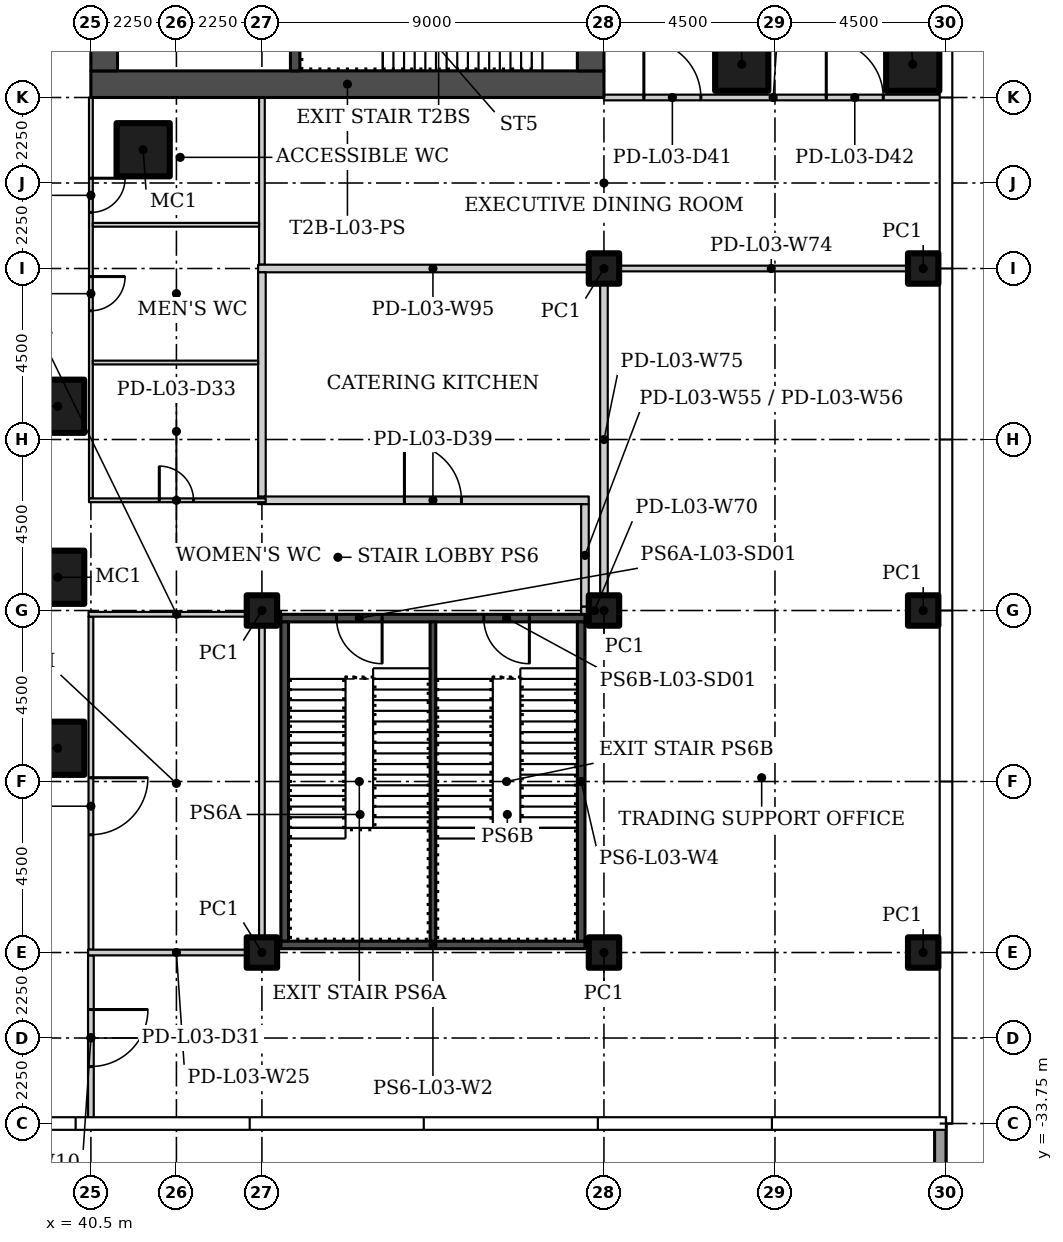
"""IFC4 building model, lengths in metres.
Left out: names, types, materials, properties, quantities, classifications, styles, units other than length and angle.
Written with IfcOpenShell. Run it as: python <this file> out.ifc"""

import sys

from ifc_helpers import new_model, si_unit, direction, frame, frame_2d, origin, origin_2d, place, context, subcontext, project, spatial, rectangle, hollow_rectangle, extrude, element, fill, save


model = new_model("IFC4")
c1 = context("Model", 3, precision=1e-05, world=origin(), true_north=direction((0.0, 1.0)))
c2 = subcontext(c1, "Body", "Model", "MODEL_VIEW")
j1 = project(units=[si_unit("LENGTHUNIT", "METRE"), si_unit("PLANEANGLEUNIT", "RADIAN")], contexts=[c1])
p1 = place(None, origin())
s1 = spatial("IfcSite", under=j1, at=p1, CompositionType="ELEMENT")
p2 = place(p1, origin())
s2 = spatial("IfcBuilding", under=s1, at=p2, CompositionType="ELEMENT")
p3 = place(p2, frame((0.0, 0.0, 18.5)))
s3 = spatial("IfcBuildingStorey", under=s2, at=p3, CompositionType="ELEMENT", Elevation=18.5)
for number, where in (
    (1, (41.875, -8.125, 0.0)),
    (2, (39.625, -14.875, 0.0)),
    (3, (39.625, -19.375, 0.0)),
    (4, (39.625, -23.875, 0.0)),
    (5, (57.625, -5.875, 0.0)),
    (6, (62.125, -5.875, 0.0)),
):
    element("IfcColumn", number, at=place(p3, frame(where)), inside=s3, PredefinedType="COLUMN", context=c2, shape_type="SweptSolid", body=[
        extrude(hollow_rectangle(XDim=1.4, YDim=1.4, WallThickness=0.06, at=origin_2d()), origin(), (0.0, 0.0, 1.0), 4.6),
    ])
for number, where in (
    (7, (45.0, -29.25, 0.0)),
    (8, (45.0, -20.25, 0.0)),
    (9, (54.0, -29.25, 0.0)),
    (10, (54.0, -20.25, 0.0)),
    (11, (54.0, -11.25, 0.0)),
    (12, (62.4, -29.25, 0.0)),
    (13, (62.4, -20.25, 0.0)),
    (14, (62.4, -11.25, 0.0)),
):
    element("IfcColumn", number, at=place(p3, frame(where)), inside=s3, PredefinedType="COLUMN", context=c2, shape_type="SweptSolid", body=[
        extrude(hollow_rectangle(XDim=0.8, YDim=0.8, WallThickness=0.03, at=origin_2d()), origin(), (0.0, 0.0, 1.0), 4.6),
    ])
p4 = place(p3, frame((40.5, -29.325, 0.0), z_axis=(0.0, 0.0, 1.0), x_axis=(0.0, -1.0, 0.0)))
e15 = element("IfcWall", 15, at=p4, inside=s3, PredefinedType="PARTITIONING", context=c2, shape_type="SweptSolid", body=[
    extrude(rectangle(XDim=4.33, YDim=0.15, at=frame_2d((2.165, 0.0))), origin(), (0.0, 0.0, 1.0), 4.6),
])
p5 = place(p4, frame((1.425, 0.0, 0.0)))
e16 = element("IfcOpeningElement", 16, at=p5, cuts=e15, PredefinedType="OPENING", context=c2, shape_type="SweptSolid", body=[
    extrude(rectangle(XDim=1.5, YDim=2.1, at=frame_2d((0.75, 1.05))), frame((0.0, 0.085, 0.0), z_axis=(0.0, -1.0, 0.0), x_axis=(1.0, 0.0, 0.0)), (0.0, 0.0, 1.0), 0.17),
])
p6 = place(p3, frame((40.5, -6.75, 0.0), z_axis=(0.0, 0.0, 1.0), x_axis=(0.0, -1.0, 0.0)))
e17 = element("IfcWall", 17, at=p6, inside=s3, PredefinedType="PARTITIONING", context=c2, shape_type="SweptSolid", body=[
    extrude(rectangle(XDim=10.55, YDim=0.1, at=frame_2d((5.275, 0.0))), origin(), (0.0, 0.0, 1.0), 4.6),
])
p7 = place(p6, frame((2.125, 0.0, 0.0)))
e18 = element("IfcOpeningElement", 18, at=p7, cuts=e17, PredefinedType="OPENING", context=c2, shape_type="SweptSolid", body=[
    extrude(rectangle(XDim=0.9, YDim=2.1, at=frame_2d((0.45, 1.05))), frame((0.0, 0.06, 0.0), z_axis=(0.0, -1.0, 0.0), x_axis=(1.0, 0.0, 0.0)), (0.0, 0.0, 1.0), 0.12),
])
p8 = place(p6, frame((4.712, 0.0, 0.0)))
e19 = element("IfcOpeningElement", 19, at=p8, cuts=e17, PredefinedType="OPENING", context=c2, shape_type="SweptSolid", body=[
    extrude(rectangle(XDim=0.9, YDim=2.1, at=frame_2d((0.45, 1.05))), frame((0.0, 0.06, 0.0), z_axis=(0.0, -1.0, 0.0), x_axis=(1.0, 0.0, 0.0)), (0.0, 0.0, 1.0), 0.12),
])
p9 = place(p3, frame((40.5, -20.412, 0.0), z_axis=(0.0, 0.0, 1.0), x_axis=(0.0, -1.0, 0.0)))
e20 = element("IfcWall", 20, at=p9, inside=s3, PredefinedType="PARTITIONING", context=c2, shape_type="SweptSolid", body=[
    extrude(rectangle(XDim=8.763, YDim=0.125, at=frame_2d((4.381, 0.0))), origin(), (0.0, 0.0, 1.0), 4.6),
])
p10 = place(p9, frame((4.238, 0.0, 0.0)))
e21 = element("IfcOpeningElement", 21, at=p10, cuts=e20, PredefinedType="OPENING", context=c2, shape_type="SweptSolid", body=[
    extrude(rectangle(XDim=1.5, YDim=2.1, at=frame_2d((0.75, 1.05))), frame((0.0, 0.073, 0.0), z_axis=(0.0, -1.0, 0.0), x_axis=(1.0, 0.0, 0.0)), (0.0, 0.0, 1.0), 0.145),
])
p11 = place(p3, frame((45.075, -29.25, 0.0), z_axis=(0.0, 0.0, 1.0), x_axis=(-1.0, 0.0, 0.0)))
e22 = element("IfcWall", 22, at=p11, inside=s3, PredefinedType="PARTITIONING", context=c2, shape_type="SweptSolid", body=[
    extrude(rectangle(XDim=4.65, YDim=0.15, at=frame_2d((2.325, 0.0))), origin(), (0.0, 0.0, 1.0), 4.6),
])
p12 = place(p3, frame((54.0, -6.75, 0.0)))
e23 = element("IfcWall", 23, at=p12, inside=s3, PredefinedType="PARTITIONING", context=c2, shape_type="SweptSolid", body=[
    extrude(rectangle(XDim=8.905, YDim=0.15, at=frame_2d((4.453, 0.0))), origin(), (0.0, 0.0, 1.0), 4.6),
])
p13 = place(p12, frame((1.05, 0.0, 0.0)))
e24 = element("IfcOpeningElement", 24, at=p13, cuts=e23, PredefinedType="OPENING", context=c2, shape_type="SweptSolid", body=[
    extrude(rectangle(XDim=1.5, YDim=2.4, at=frame_2d((0.75, 1.2))), frame((0.0, 0.085, 0.0), z_axis=(0.0, -1.0, 0.0), x_axis=(1.0, 0.0, 0.0)), (0.0, 0.0, 1.0), 0.17),
])
p14 = place(p12, frame((5.85, 0.0, 0.0)))
e25 = element("IfcOpeningElement", 25, at=p14, cuts=e23, PredefinedType="OPENING", context=c2, shape_type="SweptSolid", body=[
    extrude(rectangle(XDim=1.5, YDim=2.4, at=frame_2d((0.75, 1.2))), frame((0.0, 0.085, 0.0), z_axis=(0.0, -1.0, 0.0), x_axis=(1.0, 0.0, 0.0)), (0.0, 0.0, 1.0), 0.17),
])
p15 = place(p3, frame((45.075, -20.35, 0.0), z_axis=(0.0, 0.0, 1.0), x_axis=(-1.0, 0.0, 0.0)))
e26 = element("IfcWall", 26, at=p15, inside=s3, PredefinedType="PARTITIONING", context=c2, shape_type="SweptSolid", body=[
    extrude(rectangle(XDim=4.637, YDim=0.125, at=frame_2d((2.319, 0.0))), origin(), (0.0, 0.0, 1.0), 4.6),
])
p16 = place(p3, frame((45.5, -20.35, 0.0), z_axis=(0.0, 0.0, 1.0), x_axis=(-1.0, 0.0, 0.0)))
e27 = element("IfcWall", 27, at=p16, inside=s3, PredefinedType="PARTITIONING", context=c2, shape_type="SweptSolid", body=[
    extrude(rectangle(XDim=0.575, YDim=0.15, at=frame_2d((0.288, 0.0))), origin(), (0.0, 0.0, 1.0), 4.6),
])
p17 = place(p3, frame((53.5, -17.45, 0.0), z_axis=(0.0, 0.0, 1.0), x_axis=(0.0, -1.0, 0.0)))
e28 = element("IfcWall", 28, at=p17, inside=s3, PredefinedType="PARTITIONING", context=c2, shape_type="SweptSolid", body=[
    extrude(rectangle(XDim=2.7, YDim=0.2, at=frame_2d((1.35, 0.0))), origin(), (0.0, 0.0, 1.0), 4.6),
])
p18 = place(p3, frame((44.9, -17.35, 0.0)))
e29 = element("IfcWall", 29, at=p18, inside=s3, PredefinedType="PARTITIONING", context=c2, shape_type="SweptSolid", body=[
    extrude(rectangle(XDim=8.7, YDim=0.2, at=frame_2d((4.35, 0.0))), origin(), (0.0, 0.0, 1.0), 4.6),
])
p19 = place(p18, frame((3.85, 0.0, 0.0)))
e30 = element("IfcOpeningElement", 30, at=p19, cuts=e29, PredefinedType="OPENING", context=c2, shape_type="SweptSolid", body=[
    extrude(rectangle(XDim=1.5, YDim=2.4, at=frame_2d((0.75, 1.2))), frame((0.0, 0.11, 0.0), z_axis=(0.0, -1.0, 0.0), x_axis=(1.0, 0.0, 0.0)), (0.0, 0.0, 1.0), 0.22),
])
p20 = place(p3, frame((40.45, -17.35, 0.0)))
e31 = element("IfcWall", 31, at=p20, inside=s3, PredefinedType="PARTITIONING", context=c2, shape_type="SweptSolid", body=[
    extrude(rectangle(XDim=4.65, YDim=0.1, at=frame_2d((2.325, 0.0))), origin(), (0.0, 0.0, 1.0), 4.6),
])
p21 = place(p20, frame((1.85, 0.0, 0.0)))
e32 = element("IfcOpeningElement", 32, at=p21, cuts=e31, PredefinedType="OPENING", context=c2, shape_type="SweptSolid", body=[
    extrude(rectangle(XDim=0.9, YDim=2.1, at=frame_2d((0.45, 1.05))), frame((0.0, 0.06, 0.0), z_axis=(0.0, -1.0, 0.0), x_axis=(1.0, 0.0, 0.0)), (0.0, 0.0, 1.0), 0.12),
])
p22 = place(p3, frame((54.1, -20.25, 0.0), z_axis=(0.0, 0.0, 1.0), x_axis=(-1.0, 0.0, 0.0)))
e33 = element("IfcWall", 33, at=p22, inside=s3, PredefinedType="PARTITIONING", context=c2, shape_type="SweptSolid", body=[
    extrude(rectangle(XDim=0.7, YDim=0.2, at=frame_2d((0.35, 0.0))), origin(), (0.0, 0.0, 1.0), 4.6),
])
p23 = place(p3, frame((62.905, -11.25, 0.0), z_axis=(0.0, 0.0, 1.0), x_axis=(-1.0, 0.0, 0.0)))
e34 = element("IfcWall", 34, at=p23, inside=s3, PredefinedType="PARTITIONING", context=c2, shape_type="SweptSolid", body=[
    extrude(rectangle(XDim=9.005, YDim=0.15, at=frame_2d((4.502, 0.0))), origin(), (0.0, 0.0, 1.0), 4.6),
])
p24 = place(p3, frame((54.0, -11.35, 0.0), z_axis=(0.0, 0.0, 1.0), x_axis=(0.0, -1.0, 0.0)))
e35 = element("IfcWall", 35, at=p24, inside=s3, PredefinedType="PARTITIONING", context=c2, shape_type="SweptSolid", body=[
    extrude(rectangle(XDim=8.8, YDim=0.2, at=frame_2d((4.4, 0.0))), origin(), (0.0, 0.0, 1.0), 4.6),
])
p25 = place(p3, frame((45.0, -6.75, 0.0), z_axis=(0.0, 0.0, 1.0), x_axis=(0.0, -1.0, 0.0)))
e36 = element("IfcWall", 36, at=p25, inside=s3, PredefinedType="PARTITIONING", context=c2, shape_type="SweptSolid", body=[
    extrude(rectangle(XDim=4.4, YDim=0.15, at=frame_2d((2.2, 0.0))), origin(), (0.0, 0.0, 1.0), 4.6),
])
p26 = place(p3, frame((45.0, -20.425, 0.0), z_axis=(0.0, 0.0, 1.0), x_axis=(0.0, -1.0, 0.0)))
e37 = element("IfcWall", 37, at=p26, inside=s3, PredefinedType="PARTITIONING", context=c2, shape_type="SweptSolid", body=[
    extrude(rectangle(XDim=8.75, YDim=0.15, at=frame_2d((4.375, 0.0))), origin(), (0.0, 0.0, 1.0), 4.6),
])
p27 = place(p3, frame((44.9, -11.25, 0.0)))
e38 = element("IfcWall", 38, at=p27, inside=s3, PredefinedType="PARTITIONING", context=c2, shape_type="SweptSolid", body=[
    extrude(rectangle(XDim=9.2, YDim=0.2, at=frame_2d((4.6, 0.0))), origin(), (0.0, 0.0, 1.0), 4.6),
])
p28 = place(p3, frame((45.0, -11.35, 0.0), z_axis=(0.0, 0.0, 1.0), x_axis=(0.0, -1.0, 0.0)))
e39 = element("IfcWall", 39, at=p28, inside=s3, PredefinedType="PARTITIONING", context=c2, shape_type="SweptSolid", body=[
    extrude(rectangle(XDim=5.899, YDim=0.2, at=frame_2d((2.95, 0.0))), origin(), (0.0, 0.0, 1.0), 4.6),
])
p29 = place(p3, frame((44.9, -13.725, 0.0), z_axis=(0.0, 0.0, 1.0), x_axis=(-1.0, 0.0, 0.0)))
e40 = element("IfcWall", 40, at=p29, inside=s3, PredefinedType="PARTITIONING", context=c2, shape_type="SweptSolid", body=[
    extrude(rectangle(XDim=4.35, YDim=0.1, at=frame_2d((2.175, 0.0))), origin(), (0.0, 0.0, 1.0), 4.6),
])
p30 = place(p3, frame((44.925, -10.1, 0.0), z_axis=(0.0, 0.0, 1.0), x_axis=(-1.0, 0.0, 0.0)))
e41 = element("IfcWall", 41, at=p30, inside=s3, PredefinedType="PARTITIONING", context=c2, shape_type="SweptSolid", body=[
    extrude(rectangle(XDim=4.375, YDim=0.1, at=frame_2d((2.188, 0.0))), origin(), (0.0, 0.0, 1.0), 4.6),
])
p31 = place(p3, frame((62.85, -35.7, 0.0), z_axis=(0.0, 0.0, 1.0), x_axis=(0.0, 1.0, 0.0)))
e42 = element("IfcWall", 42, at=p31, inside=s3, PredefinedType="PARAPET", context=c2, shape_type="SweptSolid", body=[
    extrude(rectangle(XDim=1.95, YDim=0.3, at=frame_2d((0.975, 0.0))), origin(), (0.0, 0.0, 1.0), 1.1),
])
p32 = place(p3, frame((54.0, -6.4, 0.0), z_axis=(0.0, 0.0, 1.0), x_axis=(-1.0, 0.0, 0.0)))
e43 = element("IfcWall", 43, at=p32, inside=s3, PredefinedType="SHEAR", context=c2, shape_type="SweptSolid", body=[
    extrude(rectangle(XDim=13.5, YDim=0.7, at=frame_2d((6.75, 0.0))), origin(), (0.0, 0.0, 1.0), 4.6),
])
p33 = place(p3, frame((53.65, -6.05, 0.0), z_axis=(0.0, 0.0, 1.0), x_axis=(0.0, 1.0, 0.0)))
e44 = element("IfcWall", 44, at=p33, inside=s3, PredefinedType="SHEAR", context=c2, shape_type="SweptSolid", body=[
    extrude(rectangle(XDim=12.1, YDim=0.7, at=frame_2d((6.05, 0.0))), origin(), (0.0, 0.0, 1.0), 4.6),
])
p34 = place(p33, frame((6.4, 0.0, 0.0)))
e45 = element("IfcOpeningElement", 45, at=p34, cuts=e44, PredefinedType="OPENING", context=c2, shape_type="SweptSolid", body=[
    extrude(rectangle(XDim=1.8, YDim=2.4, at=frame_2d((0.9, 1.2))), frame((0.0, 0.36, 0.0), z_axis=(0.0, -1.0, 0.0), x_axis=(1.0, 0.0, 0.0)), (0.0, 0.0, 1.0), 0.72),
])
p35 = place(p3, frame((40.85, -6.05, 0.0), z_axis=(0.0, 0.0, 1.0), x_axis=(0.0, 1.0, 0.0)))
e46 = element("IfcWall", 46, at=p35, inside=s3, PredefinedType="SHEAR", context=c2, shape_type="SweptSolid", body=[
    extrude(rectangle(XDim=12.1, YDim=0.7, at=frame_2d((6.05, 0.0))), origin(), (0.0, 0.0, 1.0), 4.6),
])
p36 = place(p35, frame((0.8, 0.0, 0.0)))
e47 = element("IfcOpeningElement", 47, at=p36, cuts=e46, PredefinedType="OPENING", context=c2, shape_type="SweptSolid", body=[
    extrude(rectangle(XDim=1.2, YDim=2.1, at=frame_2d((0.6, 1.05))), frame((0.0, 0.36, 0.0), z_axis=(0.0, -1.0, 0.0), x_axis=(1.0, 0.0, 0.0)), (0.0, 0.0, 1.0), 0.72),
])
p37 = place(p35, frame((6.4, 0.0, 0.0)))
e48 = element("IfcOpeningElement", 48, at=p37, cuts=e46, PredefinedType="OPENING", context=c2, shape_type="SweptSolid", body=[
    extrude(rectangle(XDim=1.8, YDim=2.4, at=frame_2d((0.9, 1.2))), frame((0.0, 0.36, 0.0), z_axis=(0.0, -1.0, 0.0), x_axis=(1.0, 0.0, 0.0)), (0.0, 0.0, 1.0), 0.72),
])
p38 = place(p3, frame((45.875, -6.05, 0.0), z_axis=(0.0, 0.0, 1.0), x_axis=(0.0, 1.0, 0.0)))
e49 = element("IfcWall", 49, at=p38, inside=s3, PredefinedType="SHEAR", context=c2, shape_type="SweptSolid", body=[
    extrude(rectangle(XDim=2.55, YDim=0.25, at=frame_2d((1.275, 0.0))), origin(), (0.0, 0.0, 1.0), 4.6),
])
p39 = place(p3, frame((53.5, -20.45, 0.0), z_axis=(0.0, 0.0, 1.0), x_axis=(-1.0, 0.0, 0.0)))
e50 = element("IfcWall", 50, at=p39, inside=s3, PredefinedType="SHEAR", context=c2, shape_type="SweptSolid", body=[
    extrude(rectangle(XDim=8.0, YDim=0.2, at=frame_2d((4.0, 0.0))), origin(), (0.0, 0.0, 1.0), 4.6),
])
p40 = place(p39, frame((5.337, 0.0, 0.0)))
e51 = element("IfcOpeningElement", 51, at=p40, cuts=e50, PredefinedType="OPENING", context=c2, shape_type="SweptSolid", body=[
    extrude(rectangle(XDim=1.2, YDim=2.4, at=frame_2d((0.6, 1.2))), frame((0.0, 0.11, 0.0), z_axis=(0.0, -1.0, 0.0), x_axis=(1.0, 0.0, 0.0)), (0.0, 0.0, 1.0), 0.22),
])
p41 = place(p39, frame((1.462, 0.0, 0.0)))
e52 = element("IfcOpeningElement", 52, at=p41, cuts=e50, PredefinedType="OPENING", context=c2, shape_type="SweptSolid", body=[
    extrude(rectangle(XDim=1.2, YDim=2.4, at=frame_2d((0.6, 1.2))), frame((0.0, 0.11, 0.0), z_axis=(0.0, -1.0, 0.0), x_axis=(1.0, 0.0, 0.0)), (0.0, 0.0, 1.0), 0.22),
])
p42 = place(p3, frame((45.5, -29.05, 0.0)))
e53 = element("IfcWall", 53, at=p42, inside=s3, PredefinedType="SHEAR", context=c2, shape_type="SweptSolid", body=[
    extrude(rectangle(XDim=8.0, YDim=0.2, at=frame_2d((4.0, 0.0))), origin(), (0.0, 0.0, 1.0), 4.6),
])
for number, where, z_axis, x_axis in (
    (54, (45.6, -28.95, 0.0), (0.0, 0.0, 1.0), (0.0, 1.0, 0.0)),
    (55, (53.4, -28.95, 0.0), (0.0, 0.0, 1.0), (0.0, 1.0, 0.0)),
):
    element("IfcWall", number, at=place(p3, frame(where, z_axis=z_axis, x_axis=x_axis)), inside=s3, PredefinedType="SHEAR", context=c2, shape_type="SweptSolid", body=[
        extrude(rectangle(XDim=8.4, YDim=0.2, at=frame_2d((4.2, 0.0))), origin(), (0.0, 0.0, 1.0), 4.6),
    ])
p43 = place(p3, frame((49.5, -28.95, 0.0), z_axis=(0.0, 0.0, 1.0), x_axis=(0.0, 1.0, 0.0)))
e56 = element("IfcWall", 56, at=p43, inside=s3, PredefinedType="SHEAR", context=c2, shape_type="SweptSolid", body=[
    extrude(rectangle(XDim=8.4, YDim=0.15, at=frame_2d((4.2, 0.0))), origin(), (0.0, 0.0, 1.0), 4.6),
])
p44 = place(p5, origin())
e57 = element("IfcDoor", 57, at=p44, inside=s3, OperationType="DOUBLE_DOOR_SINGLE_SWING", PredefinedType="DOOR", context=c2, shape_type="SweptSolid", body=[
    extrude(rectangle(XDim=1.5, YDim=2.1, at=frame_2d((0.75, 1.05))), frame((0.0, 0.025, 0.0), z_axis=(0.0, -1.0, 0.0), x_axis=(1.0, 0.0, 0.0)), (0.0, 0.0, 1.0), 0.05),
])
fill(e16, e57)
p45 = place(p10, origin())
e58 = element("IfcDoor", 58, at=p45, inside=s3, OperationType="DOUBLE_DOOR_SINGLE_SWING", PredefinedType="DOOR", context=c2, shape_type="SweptSolid", body=[
    extrude(rectangle(XDim=1.5, YDim=2.1, at=frame_2d((0.75, 1.05))), frame((0.0, 0.025, 0.0), z_axis=(0.0, -1.0, 0.0), x_axis=(1.0, 0.0, 0.0)), (0.0, 0.0, 1.0), 0.05),
])
fill(e21, e58)
p46 = place(p21, origin())
e59 = element("IfcDoor", 59, at=p46, inside=s3, OperationType="SINGLE_SWING_LEFT", PredefinedType="DOOR", context=c2, shape_type="SweptSolid", body=[
    extrude(rectangle(XDim=0.9, YDim=2.1, at=frame_2d((0.45, 1.05))), frame((0.0, 0.025, 0.0), z_axis=(0.0, -1.0, 0.0), x_axis=(1.0, 0.0, 0.0)), (0.0, 0.0, 1.0), 0.05),
])
fill(e32, e59)
p47 = place(p7, origin())
e60 = element("IfcDoor", 60, at=p47, inside=s3, OperationType="SINGLE_SWING_RIGHT", PredefinedType="DOOR", context=c2, shape_type="SweptSolid", body=[
    extrude(rectangle(XDim=0.9, YDim=2.1, at=frame_2d((0.45, 1.05))), frame((0.0, 0.025, 0.0), z_axis=(0.0, -1.0, 0.0), x_axis=(1.0, 0.0, 0.0)), (0.0, 0.0, 1.0), 0.05),
])
fill(e18, e60)
p48 = place(p8, origin())
e61 = element("IfcDoor", 61, at=p48, inside=s3, OperationType="SINGLE_SWING_RIGHT", PredefinedType="DOOR", context=c2, shape_type="SweptSolid", body=[
    extrude(rectangle(XDim=0.9, YDim=2.1, at=frame_2d((0.45, 1.05))), frame((0.0, 0.025, 0.0), z_axis=(0.0, -1.0, 0.0), x_axis=(1.0, 0.0, 0.0)), (0.0, 0.0, 1.0), 0.05),
])
fill(e19, e61)
p49 = place(p19, origin())
e62 = element("IfcDoor", 62, at=p49, inside=s3, OperationType="DOUBLE_DOOR_SINGLE_SWING", PredefinedType="DOOR", context=c2, shape_type="SweptSolid", body=[
    extrude(rectangle(XDim=1.5, YDim=2.4, at=frame_2d((0.75, 1.2))), frame((0.0, 0.025, 0.0), z_axis=(0.0, -1.0, 0.0), x_axis=(1.0, 0.0, 0.0)), (0.0, 0.0, 1.0), 0.05),
])
fill(e30, e62)
p50 = place(p13, origin())
e63 = element("IfcDoor", 63, at=p50, inside=s3, OperationType="DOUBLE_DOOR_SINGLE_SWING", PredefinedType="DOOR", context=c2, shape_type="SweptSolid", body=[
    extrude(rectangle(XDim=1.5, YDim=2.4, at=frame_2d((0.75, 1.2))), frame((0.0, 0.025, 0.0), z_axis=(0.0, -1.0, 0.0), x_axis=(1.0, 0.0, 0.0)), (0.0, 0.0, 1.0), 0.05),
])
fill(e24, e63)
p51 = place(p14, origin())
e64 = element("IfcDoor", 64, at=p51, inside=s3, OperationType="DOUBLE_DOOR_SINGLE_SWING", PredefinedType="DOOR", context=c2, shape_type="SweptSolid", body=[
    extrude(rectangle(XDim=1.5, YDim=2.4, at=frame_2d((0.75, 1.2))), frame((0.0, 0.025, 0.0), z_axis=(0.0, -1.0, 0.0), x_axis=(1.0, 0.0, 0.0)), (0.0, 0.0, 1.0), 0.05),
])
fill(e25, e64)
p52 = place(p40, origin())
e65 = element("IfcDoor", 65, at=p52, inside=s3, OperationType="SINGLE_SWING_LEFT", PredefinedType="DOOR", context=c2, shape_type="SweptSolid", body=[
    extrude(rectangle(XDim=1.2, YDim=2.4, at=frame_2d((0.6, 1.2))), frame((0.0, 0.025, 0.0), z_axis=(0.0, -1.0, 0.0), x_axis=(1.0, 0.0, 0.0)), (0.0, 0.0, 1.0), 0.05),
])
fill(e51, e65)
p53 = place(p41, origin())
e66 = element("IfcDoor", 66, at=p53, inside=s3, OperationType="SINGLE_SWING_RIGHT", PredefinedType="DOOR", context=c2, shape_type="SweptSolid", body=[
    extrude(rectangle(XDim=1.2, YDim=2.4, at=frame_2d((0.6, 1.2))), frame((0.0, 0.025, 0.0), z_axis=(0.0, -1.0, 0.0), x_axis=(1.0, 0.0, 0.0)), (0.0, 0.0, 1.0), 0.05),
])
fill(e52, e66)
save(model, sys.argv[1])
